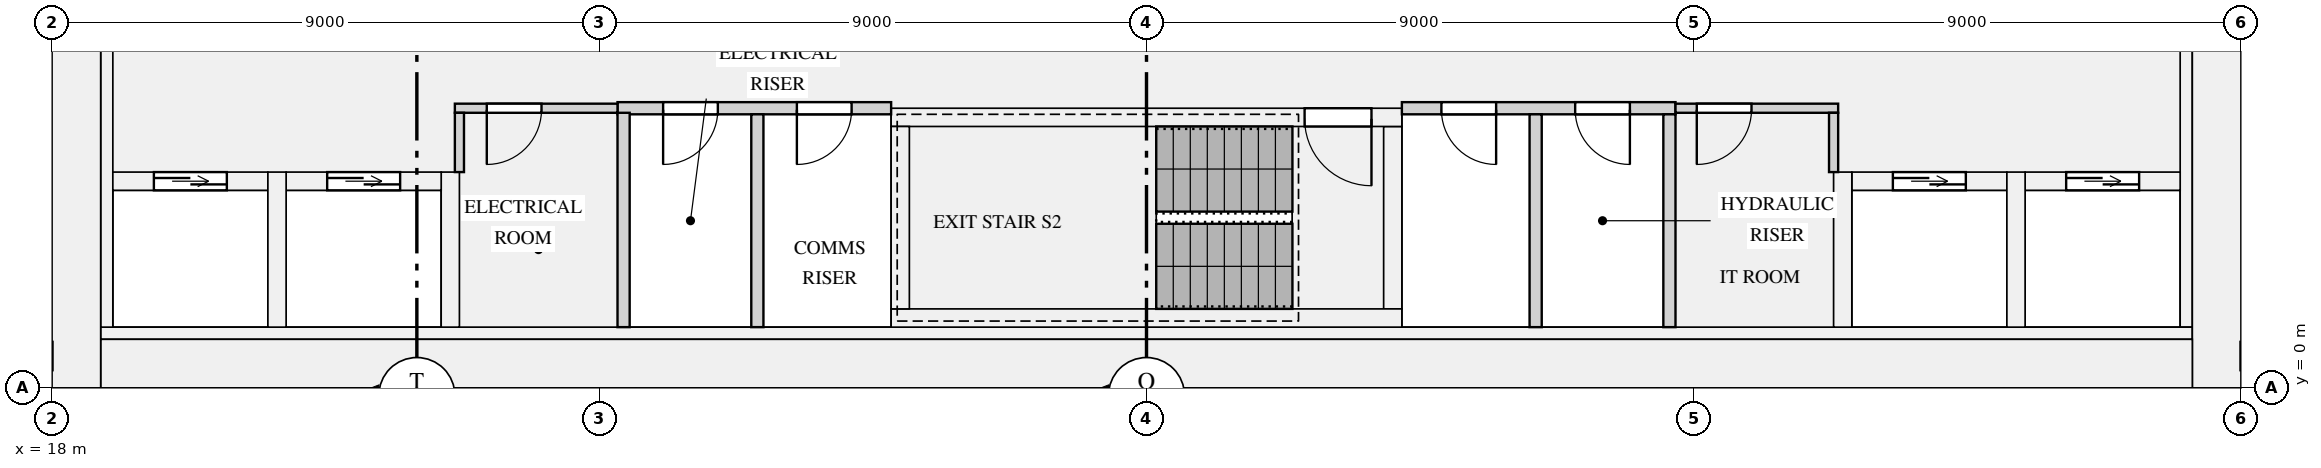
"""IFC4 building model, lengths in metres.
Left out: names, types, materials, properties, quantities, classifications, styles, units other than length and angle.
Written with IfcOpenShell. Run it as: python <this file> out.ifc"""

import sys

from ifc_helpers import new_model, si_unit, direction, frame, frame_2d, origin, place, context, subcontext, project, spatial, rectangle, extrude, element, fill, save


model = new_model("IFC4")
c1 = context("Model", 3, precision=1e-05, world=origin(), true_north=direction((0.0, 1.0)))
c2 = subcontext(c1, "Body", "Model", "MODEL_VIEW")
j1 = project(units=[si_unit("LENGTHUNIT", "METRE"), si_unit("PLANEANGLEUNIT", "RADIAN")], contexts=[c1])
p1 = place(None, origin())
s1 = spatial("IfcSite", under=j1, at=p1, CompositionType="ELEMENT")
p2 = place(p1, origin())
s2 = spatial("IfcBuilding", under=s1, at=p2, CompositionType="ELEMENT")
p3 = place(p2, frame((0.0, 0.0, 102.45)))
s3 = spatial("IfcBuildingStorey", under=s2, at=p3, CompositionType="ELEMENT", Elevation=102.45)
for number, where, z_axis, x_axis in (
    (1, (18.4, 0.0, 0.0), (0.0, 0.0, 1.0), (0.0, 1.0, 0.0)),
    (2, (53.6, 0.0, 0.0), (0.0, 0.0, 1.0), (0.0, 1.0, 0.0)),
):
    element("IfcWall", number, at=place(p3, frame(where, z_axis=z_axis, x_axis=x_axis)), inside=s3, PredefinedType="SHEAR", context=c2, shape_type="SweptSolid", body=[
        extrude(rectangle(XDim=12.5, YDim=0.8, at=frame_2d((6.25, 0.0))), origin(), (0.0, 0.0, 1.0), 3.15),
    ])
p4 = place(p3, frame((18.8, 0.4, 0.0), z_axis=(0.0, 0.0, 1.0), x_axis=(1.0, 0.0, 0.0)))
e3 = element("IfcWall", 3, at=p4, inside=s3, PredefinedType="SHEAR", context=c2, shape_type="SweptSolid", body=[
    extrude(rectangle(XDim=34.4, YDim=0.8, at=frame_2d((17.2, 0.0))), origin(), (0.0, 0.0, 1.0), 3.15),
])
for number, where, z_axis, x_axis in (
    (4, (18.9, 1.0, 0.0), (0.0, 0.0, 1.0), (0.0, 1.0, 0.0)),
    (5, (53.1, 1.0, 0.0), (0.0, 0.0, 1.0), (0.0, 1.0, 0.0)),
):
    element("IfcWall", number, at=place(p3, frame(where, z_axis=z_axis, x_axis=x_axis)), inside=s3, PredefinedType="SHEAR", context=c2, shape_type="SweptSolid", body=[
        extrude(rectangle(XDim=10.9, YDim=0.2, at=frame_2d((5.45, 0.0))), origin(), (0.0, 0.0, 1.0), 3.15),
    ])
p5 = place(p3, frame((18.8, 0.9, 0.0), z_axis=(0.0, 0.0, 1.0), x_axis=(1.0, 0.0, 0.0)))
e6 = element("IfcWall", 6, at=p5, inside=s3, PredefinedType="SHEAR", context=c2, shape_type="SweptSolid", body=[
    extrude(rectangle(XDim=34.4, YDim=0.2, at=frame_2d((17.2, 0.0))), origin(), (0.0, 0.0, 1.0), 3.15),
])
p6 = place(p3, frame((19.0, 3.4, 0.0), z_axis=(0.0, 0.0, 1.0), x_axis=(1.0, 0.0, 0.0)))
e7 = element("IfcWall", 7, at=p6, inside=s3, PredefinedType="SHEAR", context=c2, shape_type="SweptSolid", body=[
    extrude(rectangle(XDim=2.55, YDim=0.3, at=frame_2d((1.275, 0.0))), origin(), (0.0, 0.0, 1.0), 3.15),
])
p7 = place(p6, frame((0.675, 0.0, 0.0)))
e8 = element("IfcOpeningElement", 8, at=p7, cuts=e7, PredefinedType="OPENING", context=c2, shape_type="SweptSolid", body=[
    extrude(rectangle(XDim=1.2, YDim=2.1, at=frame_2d((0.6, 1.05))), frame((0.0, 0.16, 0.0), z_axis=(0.0, -1.0, 0.0), x_axis=(1.0, 0.0, 0.0)), (0.0, 0.0, 1.0), 0.32),
])
p8 = place(p3, frame((21.85, 3.4, 0.0), z_axis=(0.0, 0.0, 1.0), x_axis=(1.0, 0.0, 0.0)))
e9 = element("IfcWall", 9, at=p8, inside=s3, PredefinedType="SHEAR", context=c2, shape_type="SweptSolid", body=[
    extrude(rectangle(XDim=2.55, YDim=0.3, at=frame_2d((1.275, 0.0))), origin(), (0.0, 0.0, 1.0), 3.15),
])
p9 = place(p8, frame((0.675, 0.0, 0.0)))
e10 = element("IfcOpeningElement", 10, at=p9, cuts=e9, PredefinedType="OPENING", context=c2, shape_type="SweptSolid", body=[
    extrude(rectangle(XDim=1.2, YDim=2.1, at=frame_2d((0.6, 1.05))), frame((0.0, 0.16, 0.0), z_axis=(0.0, -1.0, 0.0), x_axis=(1.0, 0.0, 0.0)), (0.0, 0.0, 1.0), 0.32),
])
for number, where, z_axis, x_axis in (
    (11, (21.7, 1.0, 0.0), (0.0, 0.0, 1.0), (0.0, 1.0, 0.0)),
    (12, (24.55, 1.0, 0.0), (0.0, 0.0, 1.0), (0.0, 1.0, 0.0)),
):
    element("IfcWall", number, at=place(p3, frame(where, z_axis=z_axis, x_axis=x_axis)), inside=s3, PredefinedType="SHEAR", context=c2, shape_type="SweptSolid", body=[
        extrude(rectangle(XDim=2.55, YDim=0.3, at=frame_2d((1.275, 0.0))), origin(), (0.0, 0.0, 1.0), 3.15),
    ])
p10 = place(p3, frame((47.6, 3.4, 0.0), z_axis=(0.0, 0.0, 1.0), x_axis=(1.0, 0.0, 0.0)))
e13 = element("IfcWall", 13, at=p10, inside=s3, PredefinedType="SHEAR", context=c2, shape_type="SweptSolid", body=[
    extrude(rectangle(XDim=2.55, YDim=0.3, at=frame_2d((1.275, 0.0))), origin(), (0.0, 0.0, 1.0), 3.15),
])
p11 = place(p10, frame((0.675, 0.0, 0.0)))
e14 = element("IfcOpeningElement", 14, at=p11, cuts=e13, PredefinedType="OPENING", context=c2, shape_type="SweptSolid", body=[
    extrude(rectangle(XDim=1.2, YDim=2.1, at=frame_2d((0.6, 1.05))), frame((0.0, 0.16, 0.0), z_axis=(0.0, -1.0, 0.0), x_axis=(1.0, 0.0, 0.0)), (0.0, 0.0, 1.0), 0.32),
])
p12 = place(p3, frame((47.45, 1.0, 0.0), z_axis=(0.0, 0.0, 1.0), x_axis=(0.0, 1.0, 0.0)))
e15 = element("IfcWall", 15, at=p12, inside=s3, PredefinedType="SHEAR", context=c2, shape_type="SweptSolid", body=[
    extrude(rectangle(XDim=2.55, YDim=0.3, at=frame_2d((1.275, 0.0))), origin(), (0.0, 0.0, 1.0), 3.15),
])
p13 = place(p3, frame((50.45, 3.4, 0.0), z_axis=(0.0, 0.0, 1.0), x_axis=(1.0, 0.0, 0.0)))
e16 = element("IfcWall", 16, at=p13, inside=s3, PredefinedType="SHEAR", context=c2, shape_type="SweptSolid", body=[
    extrude(rectangle(XDim=2.55, YDim=0.3, at=frame_2d((1.275, 0.0))), origin(), (0.0, 0.0, 1.0), 3.15),
])
p14 = place(p13, frame((0.675, 0.0, 0.0)))
e17 = element("IfcOpeningElement", 17, at=p14, cuts=e16, PredefinedType="OPENING", context=c2, shape_type="SweptSolid", body=[
    extrude(rectangle(XDim=1.2, YDim=2.1, at=frame_2d((0.6, 1.05))), frame((0.0, 0.16, 0.0), z_axis=(0.0, -1.0, 0.0), x_axis=(1.0, 0.0, 0.0)), (0.0, 0.0, 1.0), 0.32),
])
p15 = place(p3, frame((50.3, 1.0, 0.0), z_axis=(0.0, 0.0, 1.0), x_axis=(0.0, 1.0, 0.0)))
e18 = element("IfcWall", 18, at=p15, inside=s3, PredefinedType="SHEAR", context=c2, shape_type="SweptSolid", body=[
    extrude(rectangle(XDim=2.55, YDim=0.3, at=frame_2d((1.275, 0.0))), origin(), (0.0, 0.0, 1.0), 3.15),
])
p16 = place(p3, frame((31.8, 1.15, 0.0), z_axis=(0.0, 0.0, 1.0), x_axis=(1.0, 0.0, 0.0)))
e19 = element("IfcWall", 19, at=p16, inside=s3, PredefinedType="SHEAR", context=c2, shape_type="SweptSolid", body=[
    extrude(rectangle(XDim=8.4, YDim=0.3, at=frame_2d((4.2, 0.0))), origin(), (0.0, 0.0, 1.0), 3.15),
])
p17 = place(p3, frame((31.8, 4.45, 0.0), z_axis=(0.0, 0.0, 1.0), x_axis=(1.0, 0.0, 0.0)))
e20 = element("IfcWall", 20, at=p17, inside=s3, PredefinedType="SHEAR", context=c2, shape_type="SweptSolid", body=[
    extrude(rectangle(XDim=8.4, YDim=0.3, at=frame_2d((4.2, 0.0))), origin(), (0.0, 0.0, 1.0), 3.15),
])
p18 = place(p17, frame((6.8, 0.0, 0.0)))
e21 = element("IfcOpeningElement", 21, at=p18, cuts=e20, PredefinedType="OPENING", context=c2, shape_type="SweptSolid", body=[
    extrude(rectangle(XDim=1.1, YDim=2.1, at=frame_2d((0.55, 1.05))), frame((0.0, 0.16, 0.0), z_axis=(0.0, -1.0, 0.0), x_axis=(1.0, 0.0, 0.0)), (0.0, 0.0, 1.0), 0.32),
])
for number, where, z_axis, x_axis in (
    (22, (31.95, 1.3, 0.0), (0.0, 0.0, 1.0), (0.0, 1.0, 0.0)),
    (23, (40.05, 1.3, 0.0), (0.0, 0.0, 1.0), (0.0, 1.0, 0.0)),
):
    element("IfcWall", number, at=place(p3, frame(where, z_axis=z_axis, x_axis=x_axis)), inside=s3, PredefinedType="SHEAR", context=c2, shape_type="SweptSolid", body=[
        extrude(rectangle(XDim=3.0, YDim=0.3, at=frame_2d((1.5, 0.0))), origin(), (0.0, 0.0, 1.0), 3.15),
    ])
p19 = place(p3, frame((14.05, 0.525, 0.9), z_axis=(0.0, 0.0, 1.0), x_axis=(1.0, 0.0, 0.0)))
e24 = element("IfcWall", 24, at=p19, inside=s3, PredefinedType="SOLIDWALL", context=c2, shape_type="SweptSolid", body=[
    extrude(rectangle(XDim=3.95, YDim=0.45, at=frame_2d((1.975, 0.0))), origin(), (0.0, 0.0, 1.0), 1.93),
])
p20 = place(p19, frame((1.225, 0.0, 0.15)))
e25 = element("IfcOpeningElement", 25, at=p20, cuts=e24, PredefinedType="OPENING", context=c2, shape_type="SweptSolid", body=[
    extrude(rectangle(XDim=1.5, YDim=1.5, at=frame_2d((0.75, 0.75))), frame((0.0, 0.235, 0.0), z_axis=(0.0, -1.0, 0.0), x_axis=(1.0, 0.0, 0.0)), (0.0, 0.0, 1.0), 0.47),
])
p21 = place(p3, frame((27.3, 4.6, 0.0), z_axis=(0.0, 0.0, 1.0), x_axis=(1.0, 0.0, 0.0)))
e26 = element("IfcWall", 26, at=p21, inside=s3, PredefinedType="PARTITIONING", context=c2, shape_type="SweptSolid", body=[
    extrude(rectangle(XDim=4.5, YDim=0.2, at=frame_2d((2.25, 0.0))), origin(), (0.0, 0.0, 1.0), 2.83),
])
p22 = place(p21, frame((0.75, 0.0, 0.0)))
e27 = element("IfcOpeningElement", 27, at=p22, cuts=e26, PredefinedType="OPENING", context=c2, shape_type="SweptSolid", body=[
    extrude(rectangle(XDim=0.9, YDim=2.1, at=frame_2d((0.45, 1.05))), frame((0.0, 0.11, 0.0), z_axis=(0.0, -1.0, 0.0), x_axis=(1.0, 0.0, 0.0)), (0.0, 0.0, 1.0), 0.22),
])
p23 = place(p21, frame((2.95, 0.0, 0.0)))
e28 = element("IfcOpeningElement", 28, at=p23, cuts=e26, PredefinedType="OPENING", context=c2, shape_type="SweptSolid", body=[
    extrude(rectangle(XDim=0.9, YDim=2.1, at=frame_2d((0.45, 1.05))), frame((0.0, 0.11, 0.0), z_axis=(0.0, -1.0, 0.0), x_axis=(1.0, 0.0, 0.0)), (0.0, 0.0, 1.0), 0.22),
])
p24 = place(p3, frame((40.2, 4.6, 0.0), z_axis=(0.0, 0.0, 1.0), x_axis=(1.0, 0.0, 0.0)))
e29 = element("IfcWall", 29, at=p24, inside=s3, PredefinedType="PARTITIONING", context=c2, shape_type="SweptSolid", body=[
    extrude(rectangle(XDim=4.5, YDim=0.2, at=frame_2d((2.25, 0.0))), origin(), (0.0, 0.0, 1.0), 2.83),
])
p25 = place(p24, frame((0.65, 0.0, 0.0)))
e30 = element("IfcOpeningElement", 30, at=p25, cuts=e29, PredefinedType="OPENING", context=c2, shape_type="SweptSolid", body=[
    extrude(rectangle(XDim=0.9, YDim=2.1, at=frame_2d((0.45, 1.05))), frame((0.0, 0.11, 0.0), z_axis=(0.0, -1.0, 0.0), x_axis=(1.0, 0.0, 0.0)), (0.0, 0.0, 1.0), 0.22),
])
p26 = place(p24, frame((2.85, 0.0, 0.0)))
e31 = element("IfcOpeningElement", 31, at=p26, cuts=e29, PredefinedType="OPENING", context=c2, shape_type="SweptSolid", body=[
    extrude(rectangle(XDim=0.9, YDim=2.1, at=frame_2d((0.45, 1.05))), frame((0.0, 0.11, 0.0), z_axis=(0.0, -1.0, 0.0), x_axis=(1.0, 0.0, 0.0)), (0.0, 0.0, 1.0), 0.22),
])
p27 = place(p3, frame((24.625, 4.6, 0.0), z_axis=(0.0, 0.0, 1.0), x_axis=(1.0, 0.0, 0.0)))
e32 = element("IfcWall", 32, at=p27, inside=s3, PredefinedType="PARTITIONING", context=c2, shape_type="SweptSolid", body=[
    extrude(rectangle(XDim=2.675, YDim=0.15, at=frame_2d((1.337, 0.0))), origin(), (0.0, 0.0, 1.0), 2.83),
])
p28 = place(p27, frame((0.525, 0.0, 0.0)))
e33 = element("IfcOpeningElement", 33, at=p28, cuts=e32, PredefinedType="OPENING", context=c2, shape_type="SweptSolid", body=[
    extrude(rectangle(XDim=0.9, YDim=2.1, at=frame_2d((0.45, 1.05))), frame((0.0, 0.085, 0.0), z_axis=(0.0, -1.0, 0.0), x_axis=(1.0, 0.0, 0.0)), (0.0, 0.0, 1.0), 0.17),
])
p29 = place(p3, frame((44.7, 4.6, 0.0), z_axis=(0.0, 0.0, 1.0), x_axis=(1.0, 0.0, 0.0)))
e34 = element("IfcWall", 34, at=p29, inside=s3, PredefinedType="PARTITIONING", context=c2, shape_type="SweptSolid", body=[
    extrude(rectangle(XDim=2.675, YDim=0.15, at=frame_2d((1.337, 0.0))), origin(), (0.0, 0.0, 1.0), 2.83),
])
p30 = place(p29, frame((0.35, 0.0, 0.0)))
e35 = element("IfcOpeningElement", 35, at=p30, cuts=e34, PredefinedType="OPENING", context=c2, shape_type="SweptSolid", body=[
    extrude(rectangle(XDim=0.9, YDim=2.1, at=frame_2d((0.45, 1.05))), frame((0.0, 0.085, 0.0), z_axis=(0.0, -1.0, 0.0), x_axis=(1.0, 0.0, 0.0)), (0.0, 0.0, 1.0), 0.17),
])
p31 = place(p3, frame((27.4, 1.0, 0.0), z_axis=(0.0, 0.0, 1.0), x_axis=(0.0, 1.0, 0.0)))
e36 = element("IfcWall", 36, at=p31, inside=s3, PredefinedType="PARTITIONING", context=c2, shape_type="SweptSolid", body=[
    extrude(rectangle(XDim=3.525, YDim=0.2, at=frame_2d((1.762, 0.0))), origin(), (0.0, 0.0, 1.0), 2.83),
])
for number, where, z_axis, x_axis in (
    (37, (29.6, 1.0, 0.0), (0.0, 0.0, 1.0), (0.0, 1.0, 0.0)),
    (38, (42.4, 1.0, 0.0), (0.0, 0.0, 1.0), (0.0, 1.0, 0.0)),
    (39, (44.6, 1.0, 0.0), (0.0, 0.0, 1.0), (0.0, 1.0, 0.0)),
):
    element("IfcWall", number, at=place(p3, frame(where, z_axis=z_axis, x_axis=x_axis)), inside=s3, PredefinedType="PARTITIONING", context=c2, shape_type="SweptSolid", body=[
        extrude(rectangle(XDim=3.5, YDim=0.2, at=frame_2d((1.75, 0.0))), origin(), (0.0, 0.0, 1.0), 2.83),
    ])
for number, where, z_axis, x_axis in (
    (40, (24.7, 3.55, 0.0), (0.0, 0.0, 1.0), (0.0, 1.0, 0.0)),
    (41, (47.3, 3.55, 0.0), (0.0, 0.0, 1.0), (0.0, 1.0, 0.0)),
):
    element("IfcWall", number, at=place(p3, frame(where, z_axis=z_axis, x_axis=x_axis)), inside=s3, PredefinedType="PARTITIONING", context=c2, shape_type="SweptSolid", body=[
        extrude(rectangle(XDim=0.975, YDim=0.15, at=frame_2d((0.487, 0.0))), origin(), (0.0, 0.0, 1.0), 2.83),
    ])
p32 = place(p7, origin())
e42 = element("IfcDoor", 42, at=p32, inside=s3, OperationType="DOUBLE_DOOR_SLIDING", PredefinedType="DOOR", context=c2, shape_type="SweptSolid", body=[
    extrude(rectangle(XDim=1.2, YDim=2.1, at=frame_2d((0.6, 1.05))), frame((0.0, 0.025, 0.0), z_axis=(0.0, -1.0, 0.0), x_axis=(1.0, 0.0, 0.0)), (0.0, 0.0, 1.0), 0.05),
])
fill(e8, e42)
p33 = place(p9, origin())
e43 = element("IfcDoor", 43, at=p33, inside=s3, OperationType="DOUBLE_DOOR_SLIDING", PredefinedType="DOOR", context=c2, shape_type="SweptSolid", body=[
    extrude(rectangle(XDim=1.2, YDim=2.1, at=frame_2d((0.6, 1.05))), frame((0.0, 0.025, 0.0), z_axis=(0.0, -1.0, 0.0), x_axis=(1.0, 0.0, 0.0)), (0.0, 0.0, 1.0), 0.05),
])
fill(e10, e43)
p34 = place(p11, origin())
e44 = element("IfcDoor", 44, at=p34, inside=s3, OperationType="DOUBLE_DOOR_SLIDING", PredefinedType="DOOR", context=c2, shape_type="SweptSolid", body=[
    extrude(rectangle(XDim=1.2, YDim=2.1, at=frame_2d((0.6, 1.05))), frame((0.0, 0.025, 0.0), z_axis=(0.0, -1.0, 0.0), x_axis=(1.0, 0.0, 0.0)), (0.0, 0.0, 1.0), 0.05),
])
fill(e14, e44)
p35 = place(p14, origin())
e45 = element("IfcDoor", 45, at=p35, inside=s3, OperationType="DOUBLE_DOOR_SLIDING", PredefinedType="DOOR", context=c2, shape_type="SweptSolid", body=[
    extrude(rectangle(XDim=1.2, YDim=2.1, at=frame_2d((0.6, 1.05))), frame((0.0, 0.025, 0.0), z_axis=(0.0, -1.0, 0.0), x_axis=(1.0, 0.0, 0.0)), (0.0, 0.0, 1.0), 0.05),
])
fill(e17, e45)
p36 = place(p18, frame((1.1, 0.0, 0.0), z_axis=(0.0, 0.0, 1.0), x_axis=(-1.0, 0.0, 0.0)))
e46 = element("IfcDoor", 46, at=p36, inside=s3, OperationType="SINGLE_SWING_LEFT", PredefinedType="DOOR", context=c2, shape_type="SweptSolid", body=[
    extrude(rectangle(XDim=1.1, YDim=2.1, at=frame_2d((0.55, 1.05))), frame((0.0, 0.025, 0.0), z_axis=(0.0, -1.0, 0.0), x_axis=(1.0, 0.0, 0.0)), (0.0, 0.0, 1.0), 0.05),
])
fill(e21, e46)
p37 = place(p28, frame((0.9, 0.0, 0.0), z_axis=(0.0, 0.0, 1.0), x_axis=(-1.0, 0.0, 0.0)))
e47 = element("IfcDoor", 47, at=p37, inside=s3, OperationType="SINGLE_SWING_RIGHT", PredefinedType="DOOR", context=c2, shape_type="SweptSolid", body=[
    extrude(rectangle(XDim=0.9, YDim=2.1, at=frame_2d((0.45, 1.05))), frame((0.0, 0.025, 0.0), z_axis=(0.0, -1.0, 0.0), x_axis=(1.0, 0.0, 0.0)), (0.0, 0.0, 1.0), 0.05),
])
fill(e33, e47)
p38 = place(p30, frame((0.9, 0.0, 0.0), z_axis=(0.0, 0.0, 1.0), x_axis=(-1.0, 0.0, 0.0)))
e48 = element("IfcDoor", 48, at=p38, inside=s3, OperationType="SINGLE_SWING_RIGHT", PredefinedType="DOOR", context=c2, shape_type="SweptSolid", body=[
    extrude(rectangle(XDim=0.9, YDim=2.1, at=frame_2d((0.45, 1.05))), frame((0.0, 0.025, 0.0), z_axis=(0.0, -1.0, 0.0), x_axis=(1.0, 0.0, 0.0)), (0.0, 0.0, 1.0), 0.05),
])
fill(e35, e48)
p39 = place(p22, frame((0.9, 0.0, 0.0), z_axis=(0.0, 0.0, 1.0), x_axis=(-1.0, 0.0, 0.0)))
e49 = element("IfcDoor", 49, at=p39, inside=s3, OperationType="SINGLE_SWING_RIGHT", PredefinedType="DOOR", context=c2, shape_type="SweptSolid", body=[
    extrude(rectangle(XDim=0.9, YDim=2.1, at=frame_2d((0.45, 1.05))), frame((0.0, 0.025, 0.0), z_axis=(0.0, -1.0, 0.0), x_axis=(1.0, 0.0, 0.0)), (0.0, 0.0, 1.0), 0.05),
])
fill(e27, e49)
p40 = place(p23, frame((0.9, 0.0, 0.0), z_axis=(0.0, 0.0, 1.0), x_axis=(-1.0, 0.0, 0.0)))
e50 = element("IfcDoor", 50, at=p40, inside=s3, OperationType="SINGLE_SWING_RIGHT", PredefinedType="DOOR", context=c2, shape_type="SweptSolid", body=[
    extrude(rectangle(XDim=0.9, YDim=2.1, at=frame_2d((0.45, 1.05))), frame((0.0, 0.025, 0.0), z_axis=(0.0, -1.0, 0.0), x_axis=(1.0, 0.0, 0.0)), (0.0, 0.0, 1.0), 0.05),
])
fill(e28, e50)
p41 = place(p25, frame((0.9, 0.0, 0.0), z_axis=(0.0, 0.0, 1.0), x_axis=(-1.0, 0.0, 0.0)))
e51 = element("IfcDoor", 51, at=p41, inside=s3, OperationType="SINGLE_SWING_LEFT", PredefinedType="DOOR", context=c2, shape_type="SweptSolid", body=[
    extrude(rectangle(XDim=0.9, YDim=2.1, at=frame_2d((0.45, 1.05))), frame((0.0, 0.025, 0.0), z_axis=(0.0, -1.0, 0.0), x_axis=(1.0, 0.0, 0.0)), (0.0, 0.0, 1.0), 0.05),
])
fill(e30, e51)
p42 = place(p26, frame((0.9, 0.0, 0.0), z_axis=(0.0, 0.0, 1.0), x_axis=(-1.0, 0.0, 0.0)))
e52 = element("IfcDoor", 52, at=p42, inside=s3, OperationType="SINGLE_SWING_LEFT", PredefinedType="DOOR", context=c2, shape_type="SweptSolid", body=[
    extrude(rectangle(XDim=0.9, YDim=2.1, at=frame_2d((0.45, 1.05))), frame((0.0, 0.025, 0.0), z_axis=(0.0, -1.0, 0.0), x_axis=(1.0, 0.0, 0.0)), (0.0, 0.0, 1.0), 0.05),
])
fill(e31, e52)
save(model, sys.argv[1])
